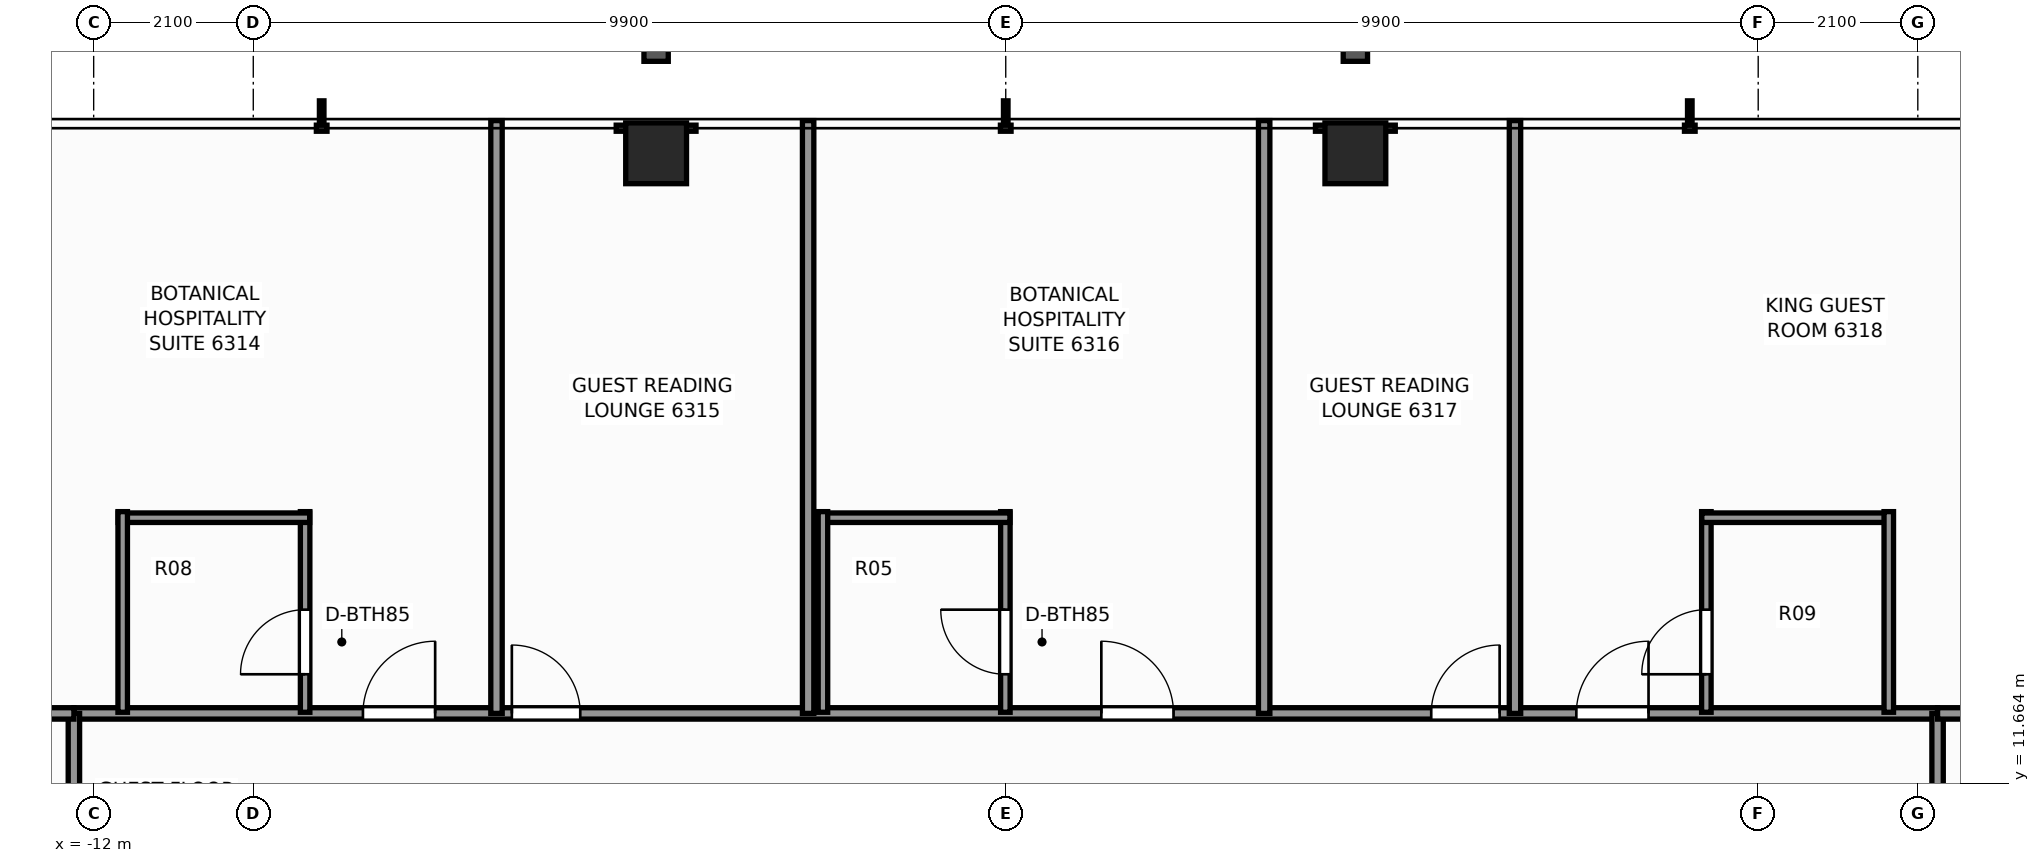
"""IFC4 building model, lengths in metres.
Left out: names, types, materials, properties, quantities, classifications, styles, units other than length and angle.
Written with IfcOpenShell. Run it as: python <this file> out.ifc"""

import sys

from ifc_helpers import new_model, si_unit, direction, frame, frame_2d, origin, origin_2d, place, context, subcontext, project, spatial, rectangle, extrude, element, fill, save


model = new_model("IFC4")
c1 = context("Model", 3, precision=1e-05, world=origin(), true_north=direction((0.0, 1.0)))
c2 = subcontext(c1, "Body", "Model", "MODEL_VIEW")
j1 = project(units=[si_unit("LENGTHUNIT", "METRE"), si_unit("PLANEANGLEUNIT", "RADIAN")], contexts=[c1])
p1 = place(None, origin())
s1 = spatial("IfcSite", under=j1, at=p1, CompositionType="ELEMENT")
p2 = place(p1, origin())
s2 = spatial("IfcBuilding", under=s1, at=p2, CompositionType="ELEMENT")
p3 = place(p2, frame((0.0, 0.0, 216.3)))
s3 = spatial("IfcBuildingStorey", under=s2, at=p3, CompositionType="ELEMENT", Elevation=216.3)
for number, where, z_axis, x_axis in (
    (1, (-4.6, 19.95, 0.0), (0.0, 0.0, 1.0), (1.0, 0.0, 0.0)),
    (2, (4.6, 19.95, 0.0), (0.0, 0.0, 1.0), (1.0, 0.0, 0.0)),
):
    element("IfcColumn", number, at=place(p3, frame(where, z_axis=z_axis, x_axis=x_axis)), inside=s3, PredefinedType="COLUMN", context=c2, shape_type="SweptSolid", body=[
        extrude(rectangle(XDim=0.8, YDim=0.8, at=origin_2d()), origin(), (0.0, 0.0, 1.0), 3.3),
    ])
p4 = place(p3, frame((-12.26, 12.58, 0.0), z_axis=(0.0, 0.0, 1.0), x_axis=(1.0, 0.0, 0.0)))
e3 = element("IfcWall", 3, at=p4, inside=s3, PredefinedType="PARTITIONING", context=c2, shape_type="SweptSolid", body=[
    extrude(rectangle(XDim=24.52, YDim=0.15, at=frame_2d((12.26, 0.0))), origin(), (0.0, 0.0, 1.0), 2.369),
])
p5 = place(p4, frame((3.803, 0.0, 0.0)))
e4 = element("IfcOpeningElement", 4, at=p5, cuts=e3, PredefinedType="OPENING", context=c2, shape_type="SweptSolid", body=[
    extrude(rectangle(XDim=0.95, YDim=2.06, at=frame_2d((0.475, 1.03))), frame((0.0, 0.085, 0.0), z_axis=(0.0, -1.0, 0.0), x_axis=(1.0, 0.0, 0.0)), (0.0, 0.0, 1.0), 0.17),
])
p6 = place(p4, frame((5.762, 0.0, 0.0)))
e5 = element("IfcOpeningElement", 5, at=p6, cuts=e3, PredefinedType="OPENING", context=c2, shape_type="SweptSolid", body=[
    extrude(rectangle(XDim=0.9, YDim=2.06, at=frame_2d((0.45, 1.03))), frame((0.0, 0.085, 0.0), z_axis=(0.0, -1.0, 0.0), x_axis=(1.0, 0.0, 0.0)), (0.0, 0.0, 1.0), 0.17),
])
p7 = place(p4, frame((13.518, 0.0, 0.0)))
e6 = element("IfcOpeningElement", 6, at=p7, cuts=e3, PredefinedType="OPENING", context=c2, shape_type="SweptSolid", body=[
    extrude(rectangle(XDim=0.95, YDim=2.06, at=frame_2d((0.475, 1.03))), frame((0.0, 0.085, 0.0), z_axis=(0.0, -1.0, 0.0), x_axis=(1.0, 0.0, 0.0)), (0.0, 0.0, 1.0), 0.17),
])
p8 = place(p4, frame((17.858, 0.0, 0.0)))
e7 = element("IfcOpeningElement", 7, at=p8, cuts=e3, PredefinedType="OPENING", context=c2, shape_type="SweptSolid", body=[
    extrude(rectangle(XDim=0.9, YDim=2.06, at=frame_2d((0.45, 1.03))), frame((0.0, 0.085, 0.0), z_axis=(0.0, -1.0, 0.0), x_axis=(1.0, 0.0, 0.0)), (0.0, 0.0, 1.0), 0.17),
])
p9 = place(p4, frame((19.767, 0.0, 0.0)))
e8 = element("IfcOpeningElement", 8, at=p9, cuts=e3, PredefinedType="OPENING", context=c2, shape_type="SweptSolid", body=[
    extrude(rectangle(XDim=0.95, YDim=2.06, at=frame_2d((0.475, 1.03))), frame((0.0, 0.085, 0.0), z_axis=(0.0, -1.0, 0.0), x_axis=(1.0, 0.0, 0.0)), (0.0, 0.0, 1.0), 0.17),
])
p10 = place(p3, frame((-12.26, -12.26, 0.0), z_axis=(0.0, 0.0, 1.0), x_axis=(0.0, 1.0, 0.0)))
e9 = element("IfcWall", 9, at=p10, inside=s3, PredefinedType="PARTITIONING", context=c2, shape_type="SweptSolid", body=[
    extrude(rectangle(XDim=24.84, YDim=0.15, at=frame_2d((12.42, 0.0))), origin(), (0.0, 0.0, 1.0), 2.369),
])
p11 = place(p10, frame((2.944, 0.0, 0.0)))
e10 = element("IfcOpeningElement", 10, at=p11, cuts=e9, PredefinedType="OPENING", context=c2, shape_type="SweptSolid", body=[
    extrude(rectangle(XDim=0.9, YDim=2.06, at=frame_2d((0.45, 1.03))), frame((0.0, 0.085, 0.0), z_axis=(0.0, -1.0, 0.0), x_axis=(1.0, 0.0, 0.0)), (0.0, 0.0, 1.0), 0.17),
])
p12 = place(p10, frame((4.832, 0.0, 0.0)))
e11 = element("IfcOpeningElement", 11, at=p12, cuts=e9, PredefinedType="OPENING", context=c2, shape_type="SweptSolid", body=[
    extrude(rectangle(XDim=0.95, YDim=2.06, at=frame_2d((0.475, 1.03))), frame((0.0, 0.085, 0.0), z_axis=(0.0, -1.0, 0.0), x_axis=(1.0, 0.0, 0.0)), (0.0, 0.0, 1.0), 0.17),
])
p13 = place(p10, frame((14.418, 0.0, 0.0)))
e12 = element("IfcOpeningElement", 12, at=p13, cuts=e9, PredefinedType="OPENING", context=c2, shape_type="SweptSolid", body=[
    extrude(rectangle(XDim=0.95, YDim=2.06, at=frame_2d((0.475, 1.03))), frame((0.0, 0.085, 0.0), z_axis=(0.0, -1.0, 0.0), x_axis=(1.0, 0.0, 0.0)), (0.0, 0.0, 1.0), 0.17),
])
p14 = place(p10, frame((20.492, 0.0, 0.0)))
e13 = element("IfcOpeningElement", 13, at=p14, cuts=e9, PredefinedType="OPENING", context=c2, shape_type="SweptSolid", body=[
    extrude(rectangle(XDim=0.95, YDim=2.06, at=frame_2d((0.475, 1.03))), frame((0.0, 0.085, 0.0), z_axis=(0.0, -1.0, 0.0), x_axis=(1.0, 0.0, 0.0)), (0.0, 0.0, 1.0), 0.17),
])
p15 = place(p3, frame((12.26, -12.26, 0.0), z_axis=(0.0, 0.0, 1.0), x_axis=(0.0, 1.0, 0.0)))
e14 = element("IfcWall", 14, at=p15, inside=s3, PredefinedType="PARTITIONING", context=c2, shape_type="SweptSolid", body=[
    extrude(rectangle(XDim=24.84, YDim=0.15, at=frame_2d((12.42, 0.0))), origin(), (0.0, 0.0, 1.0), 2.369),
])
p16 = place(p15, frame((2.686, 0.0, 0.0)))
e15 = element("IfcOpeningElement", 15, at=p16, cuts=e14, PredefinedType="OPENING", context=c2, shape_type="SweptSolid", body=[
    extrude(rectangle(XDim=0.9, YDim=2.06, at=frame_2d((0.45, 1.03))), frame((0.0, 0.085, 0.0), z_axis=(0.0, -1.0, 0.0), x_axis=(1.0, 0.0, 0.0)), (0.0, 0.0, 1.0), 0.17),
])
p17 = place(p15, frame((4.449, 0.0, 0.0)))
e16 = element("IfcOpeningElement", 16, at=p17, cuts=e14, PredefinedType="OPENING", context=c2, shape_type="SweptSolid", body=[
    extrude(rectangle(XDim=0.95, YDim=2.06, at=frame_2d((0.475, 1.03))), frame((0.0, 0.085, 0.0), z_axis=(0.0, -1.0, 0.0), x_axis=(1.0, 0.0, 0.0)), (0.0, 0.0, 1.0), 0.17),
])
p18 = place(p15, frame((13.361, 0.0, 0.0)))
e17 = element("IfcOpeningElement", 17, at=p18, cuts=e14, PredefinedType="OPENING", context=c2, shape_type="SweptSolid", body=[
    extrude(rectangle(XDim=0.95, YDim=2.06, at=frame_2d((0.475, 1.03))), frame((0.0, 0.085, 0.0), z_axis=(0.0, -1.0, 0.0), x_axis=(1.0, 0.0, 0.0)), (0.0, 0.0, 1.0), 0.17),
])
p19 = place(p15, frame((18.748, 0.0, 0.0)))
e18 = element("IfcOpeningElement", 18, at=p19, cuts=e14, PredefinedType="OPENING", context=c2, shape_type="SweptSolid", body=[
    extrude(rectangle(XDim=0.95, YDim=2.06, at=frame_2d((0.475, 1.03))), frame((0.0, 0.085, 0.0), z_axis=(0.0, -1.0, 0.0), x_axis=(1.0, 0.0, 0.0)), (0.0, 0.0, 1.0), 0.17),
])
p20 = place(p15, frame((20.836, 0.0, 0.0)))
e19 = element("IfcOpeningElement", 19, at=p20, cuts=e14, PredefinedType="OPENING", context=c2, shape_type="SweptSolid", body=[
    extrude(rectangle(XDim=0.9, YDim=2.06, at=frame_2d((0.45, 1.03))), frame((0.0, 0.085, 0.0), z_axis=(0.0, -1.0, 0.0), x_axis=(1.0, 0.0, 0.0)), (0.0, 0.0, 1.0), 0.17),
])
for number, where, z_axis, x_axis in (
    (20, (-20.38, 12.58, 0.0), (0.0, 0.0, 1.0), (1.0, 0.0, 0.0)),
    (21, (12.26, 12.58, 0.0), (0.0, 0.0, 1.0), (1.0, 0.0, 0.0)),
):
    element("IfcWall", number, at=place(p3, frame(where, z_axis=z_axis, x_axis=x_axis)), inside=s3, PredefinedType="PARTITIONING", context=c2, shape_type="SweptSolid", body=[
        extrude(rectangle(XDim=8.12, YDim=0.15, at=frame_2d((4.06, 0.0))), origin(), (0.0, 0.0, 1.0), 2.369),
    ])
p21 = place(p3, frame((-6.7, 12.58, 0.0), z_axis=(0.0, 0.0, 1.0), x_axis=(0.0, 1.0, 0.0)))
e22 = element("IfcWall", 22, at=p21, inside=s3, PredefinedType="PARTITIONING", context=c2, shape_type="SweptSolid", body=[
    extrude(rectangle(XDim=7.8, YDim=0.15, at=frame_2d((3.9, 0.0))), origin(), (0.0, 0.0, 1.0), 2.453),
])
p22 = place(p3, frame((-9.218, 12.595, 0.0), z_axis=(0.0, 0.0, 1.0), x_axis=(0.0, 1.0, 0.0)))
e23 = element("IfcWall", 23, at=p22, inside=s3, PredefinedType="PARTITIONING", context=c2, shape_type="SweptSolid", body=[
    extrude(rectangle(XDim=2.64, YDim=0.125, at=frame_2d((1.32, 0.0))), origin(), (0.0, 0.0, 1.0), 3.08),
])
p23 = place(p22, frame((0.5, 0.0, 0.0)))
e24 = element("IfcOpeningElement", 24, at=p23, cuts=e23, PredefinedType="OPENING", context=c2, shape_type="SweptSolid", body=[
    extrude(rectangle(XDim=0.85, YDim=2.03, at=frame_2d((0.425, 1.015))), frame((0.0, 0.073, 0.0), z_axis=(0.0, -1.0, 0.0), x_axis=(1.0, 0.0, 0.0)), (0.0, 0.0, 1.0), 0.145),
])
p24 = place(p3, frame((-11.678, 15.155, 0.0), z_axis=(0.0, 0.0, 1.0), x_axis=(1.0, 0.0, 0.0)))
e25 = element("IfcWall", 25, at=p24, inside=s3, PredefinedType="PARTITIONING", context=c2, shape_type="SweptSolid", body=[
    extrude(rectangle(XDim=2.52, YDim=0.125, at=frame_2d((1.26, 0.0))), origin(), (0.0, 0.0, 1.0), 2.369),
])
p25 = place(p3, frame((-11.618, 12.595, 0.0), z_axis=(0.0, 0.0, 1.0), x_axis=(0.0, 1.0, 0.0)))
e26 = element("IfcWall", 26, at=p25, inside=s3, PredefinedType="PARTITIONING", context=c2, shape_type="SweptSolid", body=[
    extrude(rectangle(XDim=2.64, YDim=0.125, at=frame_2d((1.32, 0.0))), origin(), (0.0, 0.0, 1.0), 2.369),
])
for number, where, z_axis, x_axis in (
    (27, (-2.6, 12.58, 0.0), (0.0, 0.0, 1.0), (0.0, 1.0, 0.0)),
    (28, (3.4, 12.58, 0.0), (0.0, 0.0, 1.0), (0.0, 1.0, 0.0)),
):
    element("IfcWall", number, at=place(p3, frame(where, z_axis=z_axis, x_axis=x_axis)), inside=s3, PredefinedType="PARTITIONING", context=c2, shape_type="SweptSolid", body=[
        extrude(rectangle(XDim=7.8, YDim=0.15, at=frame_2d((3.9, 0.0))), origin(), (0.0, 0.0, 1.0), 2.453),
    ])
p26 = place(p3, frame((-0.005, 12.595, 0.0), z_axis=(0.0, 0.0, 1.0), x_axis=(0.0, 1.0, 0.0)))
e29 = element("IfcWall", 29, at=p26, inside=s3, PredefinedType="PARTITIONING", context=c2, shape_type="SweptSolid", body=[
    extrude(rectangle(XDim=2.64, YDim=0.125, at=frame_2d((1.32, 0.0))), origin(), (0.0, 0.0, 1.0), 2.605),
])
p27 = place(p26, frame((0.5, 0.0, 0.0)))
e30 = element("IfcOpeningElement", 30, at=p27, cuts=e29, PredefinedType="OPENING", context=c2, shape_type="SweptSolid", body=[
    extrude(rectangle(XDim=0.85, YDim=2.03, at=frame_2d((0.425, 1.015))), frame((0.0, 0.073, 0.0), z_axis=(0.0, -1.0, 0.0), x_axis=(1.0, 0.0, 0.0)), (0.0, 0.0, 1.0), 0.145),
])
p28 = place(p3, frame((-2.465, 15.155, 0.0), z_axis=(0.0, 0.0, 1.0), x_axis=(1.0, 0.0, 0.0)))
e31 = element("IfcWall", 31, at=p28, inside=s3, PredefinedType="PARTITIONING", context=c2, shape_type="SweptSolid", body=[
    extrude(rectangle(XDim=2.52, YDim=0.125, at=frame_2d((1.26, 0.0))), origin(), (0.0, 0.0, 1.0), 2.605),
])
p29 = place(p3, frame((-2.405, 12.595, 0.0), z_axis=(0.0, 0.0, 1.0), x_axis=(0.0, 1.0, 0.0)))
e32 = element("IfcWall", 32, at=p29, inside=s3, PredefinedType="PARTITIONING", context=c2, shape_type="SweptSolid", body=[
    extrude(rectangle(XDim=2.64, YDim=0.125, at=frame_2d((1.32, 0.0))), origin(), (0.0, 0.0, 1.0), 3.08),
])
p30 = place(p3, frame((6.7, 12.58, 0.0), z_axis=(0.0, 0.0, 1.0), x_axis=(0.0, 1.0, 0.0)))
e33 = element("IfcWall", 33, at=p30, inside=s3, PredefinedType="PARTITIONING", context=c2, shape_type="SweptSolid", body=[
    extrude(rectangle(XDim=7.8, YDim=0.15, at=frame_2d((3.9, 0.0))), origin(), (0.0, 0.0, 1.0), 2.453),
])
p31 = place(p3, frame((9.218, 12.595, 0.0), z_axis=(0.0, 0.0, 1.0), x_axis=(0.0, 1.0, 0.0)))
e34 = element("IfcWall", 34, at=p31, inside=s3, PredefinedType="PARTITIONING", context=c2, shape_type="SweptSolid", body=[
    extrude(rectangle(XDim=2.64, YDim=0.125, at=frame_2d((1.32, 0.0))), origin(), (0.0, 0.0, 1.0), 3.08),
])
p32 = place(p31, frame((0.5, 0.0, 0.0)))
e35 = element("IfcOpeningElement", 35, at=p32, cuts=e34, PredefinedType="OPENING", context=c2, shape_type="SweptSolid", body=[
    extrude(rectangle(XDim=0.85, YDim=2.03, at=frame_2d((0.425, 1.015))), frame((0.0, 0.073, 0.0), z_axis=(0.0, -1.0, 0.0), x_axis=(1.0, 0.0, 0.0)), (0.0, 0.0, 1.0), 0.145),
])
p33 = place(p3, frame((9.158, 15.155, 0.0), z_axis=(0.0, 0.0, 1.0), x_axis=(1.0, 0.0, 0.0)))
e36 = element("IfcWall", 36, at=p33, inside=s3, PredefinedType="PARTITIONING", context=c2, shape_type="SweptSolid", body=[
    extrude(rectangle(XDim=2.52, YDim=0.125, at=frame_2d((1.26, 0.0))), origin(), (0.0, 0.0, 1.0), 2.369),
])
p34 = place(p3, frame((11.618, 12.595, 0.0), z_axis=(0.0, 0.0, 1.0), x_axis=(0.0, 1.0, 0.0)))
e37 = element("IfcWall", 37, at=p34, inside=s3, PredefinedType="PARTITIONING", context=c2, shape_type="SweptSolid", body=[
    extrude(rectangle(XDim=2.64, YDim=0.125, at=frame_2d((1.32, 0.0))), origin(), (0.0, 0.0, 1.0), 2.369),
])
p35 = place(p23, origin())
e38 = element("IfcDoor", 38, at=p35, inside=s3, OperationType="SINGLE_SWING_LEFT", PredefinedType="DOOR", context=c2, shape_type="SweptSolid", body=[
    extrude(rectangle(XDim=0.85, YDim=2.03, at=frame_2d((0.425, 1.015))), frame((0.0, 0.025, 0.0), z_axis=(0.0, -1.0, 0.0), x_axis=(1.0, 0.0, 0.0)), (0.0, 0.0, 1.0), 0.05),
])
fill(e24, e38)
p36 = place(p5, origin())
e39 = element("IfcDoor", 39, at=p36, inside=s3, OperationType="SINGLE_SWING_RIGHT", PredefinedType="DOOR", context=c2, shape_type="SweptSolid", body=[
    extrude(rectangle(XDim=0.95, YDim=2.06, at=frame_2d((0.475, 1.03))), frame((0.0, 0.025, 0.0), z_axis=(0.0, -1.0, 0.0), x_axis=(1.0, 0.0, 0.0)), (0.0, 0.0, 1.0), 0.05),
])
fill(e4, e39)
p37 = place(p6, origin())
e40 = element("IfcDoor", 40, at=p37, inside=s3, OperationType="SINGLE_SWING_LEFT", PredefinedType="DOOR", context=c2, shape_type="SweptSolid", body=[
    extrude(rectangle(XDim=0.9, YDim=2.06, at=frame_2d((0.45, 1.03))), frame((0.0, 0.025, 0.0), z_axis=(0.0, -1.0, 0.0), x_axis=(1.0, 0.0, 0.0)), (0.0, 0.0, 1.0), 0.05),
])
fill(e5, e40)
p38 = place(p27, origin())
e41 = element("IfcDoor", 41, at=p38, inside=s3, OperationType="SINGLE_SWING_RIGHT", PredefinedType="DOOR", context=c2, shape_type="SweptSolid", body=[
    extrude(rectangle(XDim=0.85, YDim=2.03, at=frame_2d((0.425, 1.015))), frame((0.0, 0.025, 0.0), z_axis=(0.0, -1.0, 0.0), x_axis=(1.0, 0.0, 0.0)), (0.0, 0.0, 1.0), 0.05),
])
fill(e30, e41)
p39 = place(p7, origin())
e42 = element("IfcDoor", 42, at=p39, inside=s3, OperationType="SINGLE_SWING_LEFT", PredefinedType="DOOR", context=c2, shape_type="SweptSolid", body=[
    extrude(rectangle(XDim=0.95, YDim=2.06, at=frame_2d((0.475, 1.03))), frame((0.0, 0.025, 0.0), z_axis=(0.0, -1.0, 0.0), x_axis=(1.0, 0.0, 0.0)), (0.0, 0.0, 1.0), 0.05),
])
fill(e6, e42)
p40 = place(p8, origin())
e43 = element("IfcDoor", 43, at=p40, inside=s3, OperationType="SINGLE_SWING_RIGHT", PredefinedType="DOOR", context=c2, shape_type="SweptSolid", body=[
    extrude(rectangle(XDim=0.9, YDim=2.06, at=frame_2d((0.45, 1.03))), frame((0.0, 0.025, 0.0), z_axis=(0.0, -1.0, 0.0), x_axis=(1.0, 0.0, 0.0)), (0.0, 0.0, 1.0), 0.05),
])
fill(e7, e43)
p41 = place(p32, origin())
e44 = element("IfcDoor", 44, at=p41, inside=s3, OperationType="SINGLE_SWING_LEFT", PredefinedType="DOOR", context=c2, shape_type="SweptSolid", body=[
    extrude(rectangle(XDim=0.85, YDim=2.03, at=frame_2d((0.425, 1.015))), frame((0.0, 0.025, 0.0), z_axis=(0.0, -1.0, 0.0), x_axis=(1.0, 0.0, 0.0)), (0.0, 0.0, 1.0), 0.05),
])
fill(e35, e44)
p42 = place(p9, origin())
e45 = element("IfcDoor", 45, at=p42, inside=s3, OperationType="SINGLE_SWING_RIGHT", PredefinedType="DOOR", context=c2, shape_type="SweptSolid", body=[
    extrude(rectangle(XDim=0.95, YDim=2.06, at=frame_2d((0.475, 1.03))), frame((0.0, 0.025, 0.0), z_axis=(0.0, -1.0, 0.0), x_axis=(1.0, 0.0, 0.0)), (0.0, 0.0, 1.0), 0.05),
])
fill(e8, e45)
save(model, sys.argv[1])
